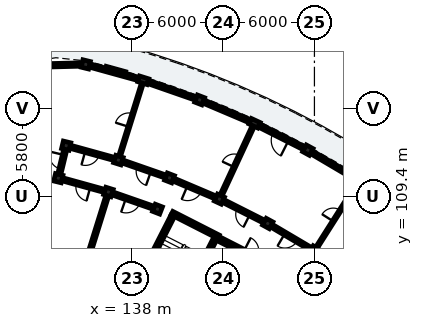
"""IFC4 building model, lengths in metres.
Left out: names, types, materials, properties, quantities, classifications, styles, units other than length and angle.
Written with IfcOpenShell. Run it as: python <this file> out.ifc"""

import sys

from ifc_helpers import new_model, si_unit, direction, frame, frame_2d, origin, origin_2d, place, context, subcontext, project, spatial, rectangle, extrude, element, fill, save


model = new_model("IFC4")
c1 = context("Model", 3, precision=1e-05, world=origin(), true_north=direction((0.0, 1.0)))
c2 = subcontext(c1, "Body", "Model", "MODEL_VIEW")
j1 = project(units=[si_unit("LENGTHUNIT", "METRE"), si_unit("PLANEANGLEUNIT", "RADIAN")], contexts=[c1])
p1 = place(None, origin())
s1 = spatial("IfcSite", under=j1, at=p1, CompositionType="ELEMENT")
p2 = place(p1, origin())
s2 = spatial("IfcBuilding", under=s1, at=p2, CompositionType="ELEMENT")
p3 = place(p2, frame((0.0, 0.0, 35.72)))
s3 = spatial("IfcBuildingStorey", under=s2, at=p3, CompositionType="ELEMENT", Elevation=35.72)
p4 = place(p3, frame((140.684, 108.139, 0.0), z_axis=(0.0, 0.0, 1.0), x_axis=(-0.453992276384, -0.891005618941, 0.0)))
e1 = element("IfcWall", 1, at=p4, inside=s3, PredefinedType="SHEAR", context=c2, shape_type="SweptSolid", body=[
    extrude(rectangle(XDim=6.6, YDim=0.25, at=frame_2d((3.3, 0.0))), origin(), (0.0, 0.0, 1.0), 3.11),
])
p5 = place(p3, frame((140.629, 108.307, 0.0), z_axis=(0.0, 0.0, 1.0), x_axis=(0.891032414707, -0.453939683153, 0.0)))
e2 = element("IfcWall", 2, at=p5, inside=s3, PredefinedType="SHEAR", context=c2, shape_type="SweptSolid", body=[
    extrude(rectangle(XDim=3.42, YDim=0.25, at=frame_2d((1.71, 0.0))), origin(), (0.0, 0.0, 1.0), 3.11),
])
p6 = place(p3, frame((143.509, 106.699, 0.0), z_axis=(0.0, 0.0, 1.0), x_axis=(-0.453992276384, -0.891005618941, 0.0)))
e3 = element("IfcWall", 3, at=p6, inside=s3, PredefinedType="SHEAR", context=c2, shape_type="SweptSolid", body=[
    extrude(rectangle(XDim=6.6, YDim=0.25, at=frame_2d((3.3, 0.0))), origin(), (0.0, 0.0, 1.0), 3.11),
])
p7 = place(p6, frame((0.22, 0.0, 0.0)))
e4 = element("IfcOpeningElement", 4, at=p7, cuts=e3, PredefinedType="OPENING", context=c2, shape_type="SweptSolid", body=[
    extrude(rectangle(XDim=1.05, YDim=2.15, at=frame_2d((0.525, 1.075))), frame((0.0, 0.135, 0.0), z_axis=(0.0, -1.0, 0.0), x_axis=(1.0, 0.0, 0.0)), (0.0, 0.0, 1.0), 0.27),
])
for number, where, z_axis, x_axis in (
    (5, (149.997, 105.813, 0.0), (0.0, 0.0, 1.0), (0.536, 0.844, 0.0)),
    (6, (146.928, 107.625, 0.0), (0.0, 0.0, 1.0), (0.48, 0.877, 0.0)),
    (7, (149.567, 112.451, 0.0), (0.0, 0.0, 1.0), (0.48, 0.877, 0.0)),
    (8, (143.748, 109.23, 0.0), (0.0, 0.0, 1.0), (0.421, 0.907, 0.0)),
):
    element("IfcColumn", number, at=place(p3, frame(where, z_axis=z_axis, x_axis=x_axis)), inside=s3, PredefinedType="COLUMN", context=c2, shape_type="SweptSolid", body=[
        extrude(rectangle(XDim=0.5, YDim=0.5, at=origin_2d()), origin(), (0.0, 0.0, 1.0), 3.115),
    ])
p8 = place(p3, frame((146.062, 114.219, 0.0), z_axis=(0.0, 0.0, 1.0), x_axis=(0.420859860775, 0.907125668024, 0.0)))
e9 = element("IfcColumn", 9, at=p8, inside=s3, PredefinedType="PILASTER", context=c2, shape_type="SweptSolid", body=[
    extrude(rectangle(XDim=0.39, YDim=0.63, at=origin_2d()), origin(), (0.0, 0.0, 1.0), 3.115),
])
for number, where, z_axis, x_axis in (
    (10, (139.675, 108.57, 0.0), (0.0, 0.0, 1.0), (0.36, 0.933, 0.0)),
    (11, (140.468, 110.622, 0.0), (0.0, 0.0, 1.0), (0.36, 0.933, 0.0)),
    (12, (142.448, 115.753, 0.0), (0.0, 0.0, 1.0), (0.36, 0.933, 0.0)),
    (13, (136.448, 109.695, 0.0), (0.0, 0.0, 1.0), (0.298, 0.955, 0.0)),
    (14, (137.103, 111.795, 0.0), (0.0, 0.0, 1.0), (0.298, 0.955, 0.0)),
):
    element("IfcColumn", number, at=place(p3, frame(where, z_axis=z_axis, x_axis=x_axis)), inside=s3, PredefinedType="COLUMN", context=c2, shape_type="SweptSolid", body=[
        extrude(rectangle(XDim=0.5, YDim=0.5, at=origin_2d()), origin(), (0.0, 0.0, 1.0), 3.115),
    ])
p9 = place(p3, frame((138.742, 117.046, 0.0), z_axis=(0.0, 0.0, 1.0), x_axis=(0.297930225503, 0.954587649581, 0.0)))
e15 = element("IfcColumn", 15, at=p9, inside=s3, PredefinedType="PILASTER", context=c2, shape_type="SweptSolid", body=[
    extrude(rectangle(XDim=0.39, YDim=0.63, at=origin_2d()), origin(), (0.0, 0.0, 1.0), 3.115),
])
for number, where, z_axis, x_axis in (
    (16, (133.153, 110.606, 0.0), (0.0, 0.0, 1.0), (0.234, 0.972, 0.0)),
    (17, (133.669, 112.744, 0.0), (0.0, 0.0, 1.0), (0.234, 0.972, 0.0)),
    (18, (134.958, 118.091, 0.0), (0.0, 0.0, 1.0), (0.234, 0.972, 0.0)),
):
    element("IfcColumn", number, at=place(p3, frame(where, z_axis=z_axis, x_axis=x_axis)), inside=s3, PredefinedType="COLUMN", context=c2, shape_type="SweptSolid", body=[
        extrude(rectangle(XDim=0.5, YDim=0.5, at=origin_2d()), origin(), (0.0, 0.0, 1.0), 3.115),
    ])
p10 = place(p3, frame((152.805, 110.539, 0.0), z_axis=(0.0, 0.0, 1.0), x_axis=(-0.861133733249, 0.508378494294, 0.0)))
e19 = element("IfcWall", 19, at=p10, inside=s3, PredefinedType="SOLIDWALL", context=c2, shape_type="SweptSolid", body=[
    extrude(rectangle(XDim=3.541, YDim=0.22, at=frame_2d((1.771, 0.0))), origin(), (0.0, 0.0, 1.0), 2.355),
])
p11 = place(p10, frame((0.896, 0.0, 0.35)))
e20 = element("IfcOpeningElement", 20, at=p11, cuts=e19, PredefinedType="OPENING", context=c2, shape_type="SweptSolid", body=[
    extrude(rectangle(XDim=1.75, YDim=1.85, at=frame_2d((0.875, 0.925))), frame((0.0, 0.12, 0.0), z_axis=(0.0, -1.0, 0.0), x_axis=(1.0, 0.0, 0.0)), (0.0, 0.0, 1.0), 0.24),
])
p12 = place(p3, frame((149.371, 112.55, 0.0), z_axis=(0.0, 0.0, 1.0), x_axis=(-0.892766264705, 0.450520140066, 0.0)))
e21 = element("IfcWall", 21, at=p12, inside=s3, PredefinedType="SOLIDWALL", context=c2, shape_type="SweptSolid", body=[
    extrude(rectangle(XDim=3.541, YDim=0.22, at=frame_2d((1.771, 0.0))), origin(), (0.0, 0.0, 1.0), 2.355),
])
p13 = place(p12, frame((1.2, 0.0, 0.0)))
e22 = element("IfcOpeningElement", 22, at=p13, cuts=e21, PredefinedType="OPENING", context=c2, shape_type="SweptSolid", body=[
    extrude(rectangle(XDim=1.14, YDim=2.16, at=frame_2d((0.57, 1.08))), frame((0.0, 0.12, 0.0), z_axis=(0.0, -1.0, 0.0), x_axis=(1.0, 0.0, 0.0)), (0.0, 0.0, 1.0), 0.24),
])
p14 = place(p3, frame((145.91, 114.284, 0.0), z_axis=(0.0, 0.0, 1.0), x_axis=(-0.920498375564, 0.390746389088, 0.0)))
e23 = element("IfcWall", 23, at=p14, inside=s3, PredefinedType="SOLIDWALL", context=c2, shape_type="SweptSolid", body=[
    extrude(rectangle(XDim=3.541, YDim=0.22, at=frame_2d((1.771, 0.0))), origin(), (0.0, 0.0, 1.0), 2.355),
])
p15 = place(p14, frame((1.031, 0.0, 0.55)))
e24 = element("IfcOpeningElement", 24, at=p15, cuts=e23, PredefinedType="OPENING", context=c2, shape_type="SweptSolid", body=[
    extrude(rectangle(XDim=1.48, YDim=1.62, at=frame_2d((0.74, 0.81))), frame((0.0, 0.12, 0.0), z_axis=(0.0, -1.0, 0.0), x_axis=(1.0, 0.0, 0.0)), (0.0, 0.0, 1.0), 0.24),
])
p16 = place(p3, frame((142.241, 115.826, 0.0), z_axis=(0.0, 0.0, 1.0), x_axis=(-0.944250036963, 0.329229202373, 0.0)))
e25 = element("IfcWall", 25, at=p16, inside=s3, PredefinedType="SOLIDWALL", context=c2, shape_type="SweptSolid", body=[
    extrude(rectangle(XDim=3.541, YDim=0.22, at=frame_2d((1.771, 0.0))), origin(), (0.0, 0.0, 1.0), 2.355),
])
p17 = place(p16, frame((1.17, 0.0, 0.55)))
e26 = element("IfcOpeningElement", 26, at=p17, cuts=e25, PredefinedType="OPENING", context=c2, shape_type="SweptSolid", body=[
    extrude(rectangle(XDim=1.2, YDim=1.51, at=frame_2d((0.6, 0.755))), frame((0.0, 0.12, 0.0), z_axis=(0.0, -1.0, 0.0), x_axis=(1.0, 0.0, 0.0)), (0.0, 0.0, 1.0), 0.24),
])
p18 = place(p3, frame((138.583, 117.09, 0.0), z_axis=(0.0, 0.0, 1.0), x_axis=(-0.963891366843, 0.266295762125, 0.0)))
e27 = element("IfcWall", 27, at=p18, inside=s3, PredefinedType="SOLIDWALL", context=c2, shape_type="SweptSolid", body=[
    extrude(rectangle(XDim=3.541, YDim=0.22, at=frame_2d((1.771, 0.0))), origin(), (0.0, 0.0, 1.0), 2.355),
])
p19 = place(p18, frame((1.11, 0.0, 0.55)))
e28 = element("IfcOpeningElement", 28, at=p19, cuts=e27, PredefinedType="OPENING", context=c2, shape_type="SweptSolid", body=[
    extrude(rectangle(XDim=1.32, YDim=1.585, at=frame_2d((0.66, 0.792))), frame((0.0, 0.12, 0.0), z_axis=(0.0, -1.0, 0.0), x_axis=(1.0, 0.0, 0.0)), (0.0, 0.0, 1.0), 0.24),
])
p20 = place(p3, frame((131.051, 117.993, 0.0), z_axis=(0.0, 0.0, 1.0), x_axis=(0.999683064576, 0.025174796915, 0.0)))
e29 = element("IfcWall", 29, at=p20, inside=s3, PredefinedType="SOLIDWALL", context=c2, shape_type="SweptSolid", body=[
    extrude(rectangle(XDim=3.908, YDim=0.22, at=frame_2d((1.954, 0.0))), origin(), (0.0, 0.0, 1.0), 2.355),
])
p21 = place(p20, frame((1.029, 0.0, 0.4)))
e30 = element("IfcOpeningElement", 30, at=p21, cuts=e29, PredefinedType="OPENING", context=c2, shape_type="SweptSolid", body=[
    extrude(rectangle(XDim=1.85, YDim=1.72, at=frame_2d((0.925, 0.86))), frame((0.0, 0.12, 0.0), z_axis=(0.0, -1.0, 0.0), x_axis=(1.0, 0.0, 0.0)), (0.0, 0.0, 1.0), 0.24),
])
p22 = place(p3, frame((143.625, 106.696, 0.0), z_axis=(0.0, 0.0, 1.0), x_axis=(0.891003372311, -0.453996685595, 0.0)))
e31 = element("IfcWall", 31, at=p22, inside=s3, PredefinedType="PARTITIONING", context=c2, shape_type="SweptSolid", body=[
    extrude(rectangle(XDim=4.9, YDim=0.22, at=frame_2d((2.45, 0.0))), origin(), (0.0, 0.0, 1.0), 2.34),
])
p23 = place(p22, frame((1.95, 0.0, 0.0)))
e32 = element("IfcOpeningElement", 32, at=p23, cuts=e31, PredefinedType="OPENING", context=c2, shape_type="SweptSolid", body=[
    extrude(rectangle(XDim=0.98, YDim=2.14, at=frame_2d((0.49, 1.07))), frame((0.0, 0.12, 0.0), z_axis=(0.0, -1.0, 0.0), x_axis=(1.0, 0.0, 0.0)), (0.0, 0.0, 1.0), 0.24),
])
p24 = place(p3, frame((150.211, 106.151, 0.0), z_axis=(0.0, 0.0, 1.0), x_axis=(0.536492262982, 0.843905238614, 0.0)))
e33 = element("IfcWall", 33, at=p24, inside=s3, PredefinedType="PARTITIONING", context=c2, shape_type="SweptSolid", body=[
    extrude(rectangle(XDim=4.7, YDim=0.125, at=frame_2d((2.35, 0.0))), origin(), (0.0, 0.0, 1.0), 2.37),
])
p25 = place(p24, frame((1.915, 0.0, 0.0)))
e34 = element("IfcOpeningElement", 34, at=p25, cuts=e33, PredefinedType="OPENING", context=c2, shape_type="SweptSolid", body=[
    extrude(rectangle(XDim=0.87, YDim=2.08, at=frame_2d((0.435, 1.04))), frame((0.0, 0.073, 0.0), z_axis=(0.0, -1.0, 0.0), x_axis=(1.0, 0.0, 0.0)), (0.0, 0.0, 1.0), 0.145),
])
p26 = place(p3, frame((149.695, 105.991, 0.0), z_axis=(0.0, 0.0, 1.0), x_axis=(-0.861113214678, 0.508413248753, 0.0)))
e35 = element("IfcWall", 35, at=p26, inside=s3, PredefinedType="PARTITIONING", context=c2, shape_type="SweptSolid", body=[
    extrude(rectangle(XDim=2.863, YDim=0.205, at=frame_2d((1.432, 0.0))), origin(), (0.0, 0.0, 1.0), 2.37),
])
p27 = place(p26, frame((0.957, 0.0, 0.0)))
e36 = element("IfcOpeningElement", 36, at=p27, cuts=e35, PredefinedType="OPENING", context=c2, shape_type="SweptSolid", body=[
    extrude(rectangle(XDim=0.95, YDim=2.13, at=frame_2d((0.475, 1.065))), frame((0.0, 0.113, 0.0), z_axis=(0.0, -1.0, 0.0), x_axis=(1.0, 0.0, 0.0)), (0.0, 0.0, 1.0), 0.225),
])
p28 = place(p3, frame((146.616, 107.782, 0.0), z_axis=(0.0, 0.0, 1.0), x_axis=(-0.89273239336, 0.450587254419, 0.0)))
e37 = element("IfcWall", 37, at=p28, inside=s3, PredefinedType="PARTITIONING", context=c2, shape_type="SweptSolid", body=[
    extrude(rectangle(XDim=2.863, YDim=0.205, at=frame_2d((1.432, 0.0))), origin(), (0.0, 0.0, 1.0), 2.37),
])
p29 = place(p28, frame((0.967, 0.0, 0.0)))
e38 = element("IfcOpeningElement", 38, at=p29, cuts=e37, PredefinedType="OPENING", context=c2, shape_type="SweptSolid", body=[
    extrude(rectangle(XDim=0.93, YDim=2.12, at=frame_2d((0.465, 1.06))), frame((0.0, 0.113, 0.0), z_axis=(0.0, -1.0, 0.0), x_axis=(1.0, 0.0, 0.0)), (0.0, 0.0, 1.0), 0.225),
])
p30 = place(p3, frame((143.916, 109.593, 0.0), z_axis=(0.0, 0.0, 1.0), x_axis=(0.420862519045, 0.907124434718, 0.0)))
e39 = element("IfcWall", 39, at=p30, inside=s3, PredefinedType="PLUMBINGWALL", context=c2, shape_type="SweptSolid", body=[
    extrude(rectangle(XDim=4.7, YDim=0.15, at=frame_2d((2.35, 0.0))), origin(), (0.0, 0.0, 1.0), 2.37),
])
p31 = place(p30, frame((1.92, 0.0, 0.0)))
e40 = element("IfcOpeningElement", 40, at=p31, cuts=e39, PredefinedType="OPENING", context=c2, shape_type="SweptSolid", body=[
    extrude(rectangle(XDim=0.86, YDim=2.06, at=frame_2d((0.43, 1.03))), frame((0.0, 0.085, 0.0), z_axis=(0.0, -1.0, 0.0), x_axis=(1.0, 0.0, 0.0)), (0.0, 0.0, 1.0), 0.17),
])
p32 = place(p3, frame((143.425, 109.367, 0.0), z_axis=(0.0, 0.0, 1.0), x_axis=(-0.920511160294, 0.390716270168, 0.0)))
e41 = element("IfcWall", 41, at=p32, inside=s3, PredefinedType="PARTITIONING", context=c2, shape_type="SweptSolid", body=[
    extrude(rectangle(XDim=2.863, YDim=0.205, at=frame_2d((1.432, 0.0))), origin(), (0.0, 0.0, 1.0), 2.37),
])
p33 = place(p32, frame((0.937, 0.0, 0.0)))
e42 = element("IfcOpeningElement", 42, at=p33, cuts=e41, PredefinedType="OPENING", context=c2, shape_type="SweptSolid", body=[
    extrude(rectangle(XDim=0.99, YDim=2.16, at=frame_2d((0.495, 1.08))), frame((0.0, 0.113, 0.0), z_axis=(0.0, -1.0, 0.0), x_axis=(1.0, 0.0, 0.0)), (0.0, 0.0, 1.0), 0.225),
])
p34 = place(p3, frame((140.137, 110.738, 0.0), z_axis=(0.0, 0.0, 1.0), x_axis=(-0.944253820929, 0.329218349522, 0.0)))
e43 = element("IfcWall", 43, at=p34, inside=s3, PredefinedType="PARTITIONING", context=c2, shape_type="SweptSolid", body=[
    extrude(rectangle(XDim=2.863, YDim=0.205, at=frame_2d((1.432, 0.0))), origin(), (0.0, 0.0, 1.0), 2.37),
])
p35 = place(p34, frame((0.947, 0.0, 0.0)))
e44 = element("IfcOpeningElement", 44, at=p35, cuts=e43, PredefinedType="OPENING", context=c2, shape_type="SweptSolid", body=[
    extrude(rectangle(XDim=0.97, YDim=2.15, at=frame_2d((0.485, 1.075))), frame((0.0, 0.113, 0.0), z_axis=(0.0, -1.0, 0.0), x_axis=(1.0, 0.0, 0.0)), (0.0, 0.0, 1.0), 0.225),
])
p36 = place(p3, frame((139.345, 108.685, 0.0), z_axis=(0.0, 0.0, 1.0), x_axis=(-0.944265123647, 0.329185929627, 0.0)))
e45 = element("IfcWall", 45, at=p36, inside=s3, PredefinedType="PARTITIONING", context=c2, shape_type="SweptSolid", body=[
    extrude(rectangle(XDim=2.718, YDim=0.205, at=frame_2d((1.359, 0.0))), origin(), (0.0, 0.0, 1.0), 2.37),
])
p37 = place(p36, frame((0.874, 0.0, 0.0)))
e46 = element("IfcOpeningElement", 46, at=p37, cuts=e45, PredefinedType="OPENING", context=c2, shape_type="SweptSolid", body=[
    extrude(rectangle(XDim=0.97, YDim=2.15, at=frame_2d((0.485, 1.075))), frame((0.0, 0.113, 0.0), z_axis=(0.0, -1.0, 0.0), x_axis=(1.0, 0.0, 0.0)), (0.0, 0.0, 1.0), 0.225),
])
p38 = place(p3, frame((137.222, 112.177, 0.0), z_axis=(0.0, 0.0, 1.0), x_axis=(0.297905254614, 0.954595442726, 0.0)))
e47 = element("IfcWall", 47, at=p38, inside=s3, PredefinedType="PARTITIONING", context=c2, shape_type="SweptSolid", body=[
    extrude(rectangle(XDim=4.7, YDim=0.125, at=frame_2d((2.35, 0.0))), origin(), (0.0, 0.0, 1.0), 2.37),
])
p39 = place(p38, frame((1.895, 0.0, 0.0)))
e48 = element("IfcOpeningElement", 48, at=p39, cuts=e47, PredefinedType="OPENING", context=c2, shape_type="SweptSolid", body=[
    extrude(rectangle(XDim=0.91, YDim=2.1, at=frame_2d((0.455, 1.05))), frame((0.0, 0.073, 0.0), z_axis=(0.0, -1.0, 0.0), x_axis=(1.0, 0.0, 0.0)), (0.0, 0.0, 1.0), 0.145),
])
p40 = place(p3, frame((134.362, 103.013, 0.0), z_axis=(0.0, 0.0, 1.0), x_axis=(0.2979590431, 0.954578655028, 0.0)))
e49 = element("IfcWall", 49, at=p40, inside=s3, PredefinedType="PARTITIONING", context=c2, shape_type="SweptSolid", body=[
    extrude(rectangle(XDim=6.6, YDim=0.185, at=frame_2d((3.3, 0.0))), origin(), (0.0, 0.0, 1.0), 2.37),
])
p41 = place(p3, frame((136.766, 111.889, 0.0), z_axis=(0.0, 0.0, 1.0), x_axis=(-0.963890789093, 0.266297853356, 0.0)))
e50 = element("IfcWall", 50, at=p41, inside=s3, PredefinedType="PARTITIONING", context=c2, shape_type="SweptSolid", body=[
    extrude(rectangle(XDim=2.863, YDim=0.205, at=frame_2d((1.432, 0.0))), origin(), (0.0, 0.0, 1.0), 2.37),
])
p42 = place(p41, frame((0.957, 0.0, 0.0)))
e51 = element("IfcOpeningElement", 51, at=p42, cuts=e50, PredefinedType="OPENING", context=c2, shape_type="SweptSolid", body=[
    extrude(rectangle(XDim=0.95, YDim=2.13, at=frame_2d((0.475, 1.065))), frame((0.0, 0.113, 0.0), z_axis=(0.0, -1.0, 0.0), x_axis=(1.0, 0.0, 0.0)), (0.0, 0.0, 1.0), 0.225),
])
p43 = place(p3, frame((136.11, 109.789, 0.0), z_axis=(0.0, 0.0, 1.0), x_axis=(-0.96388375821, 0.266323301006, 0.0)))
e52 = element("IfcWall", 52, at=p43, inside=s3, PredefinedType="PARTITIONING", context=c2, shape_type="SweptSolid", body=[
    extrude(rectangle(XDim=2.718, YDim=0.205, at=frame_2d((1.359, 0.0))), origin(), (0.0, 0.0, 1.0), 2.37),
])
p44 = place(p43, frame((0.884, 0.0, 0.0)))
e53 = element("IfcOpeningElement", 53, at=p44, cuts=e52, PredefinedType="OPENING", context=c2, shape_type="SweptSolid", body=[
    extrude(rectangle(XDim=0.95, YDim=2.13, at=frame_2d((0.475, 1.065))), frame((0.0, 0.113, 0.0), z_axis=(0.0, -1.0, 0.0), x_axis=(1.0, 0.0, 0.0)), (0.0, 0.0, 1.0), 0.225),
])
p45 = place(p3, frame((133.165, 110.654, 0.0), z_axis=(0.0, 0.0, 1.0), x_axis=(0.23437535251, 0.972146179407, 0.0)))
e54 = element("IfcWall", 54, at=p45, inside=s3, PredefinedType="PARTITIONING", context=c2, shape_type="SweptSolid", body=[
    extrude(rectangle(XDim=2.1, YDim=0.205, at=frame_2d((1.05, 0.0))), origin(), (0.0, 0.0, 1.0), 2.37),
])
p46 = place(p45, frame((0.57, 0.0, 0.0)))
e55 = element("IfcOpeningElement", 55, at=p46, cuts=e54, PredefinedType="OPENING", context=c2, shape_type="SweptSolid", body=[
    extrude(rectangle(XDim=0.95, YDim=2.13, at=frame_2d((0.475, 1.065))), frame((0.0, 0.113, 0.0), z_axis=(0.0, -1.0, 0.0), x_axis=(1.0, 0.0, 0.0)), (0.0, 0.0, 1.0), 0.225),
])
p47 = place(p11, origin())
e56 = element("IfcWindow", 56, at=p47, inside=s3, PartitioningType="SINGLE_PANEL", PredefinedType="WINDOW", context=c2, shape_type="SweptSolid", body=[
    extrude(rectangle(XDim=1.75, YDim=1.85, at=frame_2d((0.875, 0.925))), frame((0.0, 0.03, 0.0), z_axis=(0.0, -1.0, 0.0), x_axis=(1.0, 0.0, 0.0)), (0.0, 0.0, 1.0), 0.06),
])
fill(e20, e56)
p48 = place(p13, origin())
e57 = element("IfcDoor", 57, at=p48, inside=s3, OperationType="SINGLE_SWING_LEFT", PredefinedType="DOOR", context=c2, shape_type="SweptSolid", body=[
    extrude(rectangle(XDim=1.14, YDim=2.16, at=frame_2d((0.57, 1.08))), frame((0.0, 0.025, 0.0), z_axis=(0.0, -1.0, 0.0), x_axis=(1.0, 0.0, 0.0)), (0.0, 0.0, 1.0), 0.05),
])
fill(e22, e57)
p49 = place(p15, origin())
e58 = element("IfcWindow", 58, at=p49, inside=s3, PartitioningType="SINGLE_PANEL", PredefinedType="WINDOW", context=c2, shape_type="SweptSolid", body=[
    extrude(rectangle(XDim=1.48, YDim=1.62, at=frame_2d((0.74, 0.81))), frame((0.0, 0.03, 0.0), z_axis=(0.0, -1.0, 0.0), x_axis=(1.0, 0.0, 0.0)), (0.0, 0.0, 1.0), 0.06),
])
fill(e24, e58)
p50 = place(p17, origin())
e59 = element("IfcWindow", 59, at=p50, inside=s3, PartitioningType="SINGLE_PANEL", PredefinedType="WINDOW", context=c2, shape_type="SweptSolid", body=[
    extrude(rectangle(XDim=1.2, YDim=1.51, at=frame_2d((0.6, 0.755))), frame((0.0, 0.03, 0.0), z_axis=(0.0, -1.0, 0.0), x_axis=(1.0, 0.0, 0.0)), (0.0, 0.0, 1.0), 0.06),
])
fill(e26, e59)
p51 = place(p19, origin())
e60 = element("IfcWindow", 60, at=p51, inside=s3, PartitioningType="SINGLE_PANEL", PredefinedType="WINDOW", context=c2, shape_type="SweptSolid", body=[
    extrude(rectangle(XDim=1.32, YDim=1.585, at=frame_2d((0.66, 0.792))), frame((0.0, 0.03, 0.0), z_axis=(0.0, -1.0, 0.0), x_axis=(1.0, 0.0, 0.0)), (0.0, 0.0, 1.0), 0.06),
])
fill(e28, e60)
p52 = place(p21, origin())
e61 = element("IfcWindow", 61, at=p52, inside=s3, PartitioningType="SINGLE_PANEL", PredefinedType="WINDOW", context=c2, shape_type="SweptSolid", body=[
    extrude(rectangle(XDim=1.85, YDim=1.72, at=frame_2d((0.925, 0.86))), frame((0.0, 0.03, 0.0), z_axis=(0.0, -1.0, 0.0), x_axis=(1.0, 0.0, 0.0)), (0.0, 0.0, 1.0), 0.06),
])
fill(e30, e61)
p53 = place(p7, origin())
e62 = element("IfcDoor", 62, at=p53, inside=s3, OperationType="SINGLE_SWING_LEFT", PredefinedType="DOOR", context=c2, shape_type="SweptSolid", body=[
    extrude(rectangle(XDim=1.05, YDim=2.15, at=frame_2d((0.525, 1.075))), frame((0.0, 0.025, 0.0), z_axis=(0.0, -1.0, 0.0), x_axis=(1.0, 0.0, 0.0)), (0.0, 0.0, 1.0), 0.05),
])
fill(e4, e62)
p54 = place(p25, origin())
e63 = element("IfcDoor", 63, at=p54, inside=s3, OperationType="SINGLE_SWING_LEFT", PredefinedType="DOOR", context=c2, shape_type="SweptSolid", body=[
    extrude(rectangle(XDim=0.87, YDim=2.08, at=frame_2d((0.435, 1.04))), frame((0.0, 0.025, 0.0), z_axis=(0.0, -1.0, 0.0), x_axis=(1.0, 0.0, 0.0)), (0.0, 0.0, 1.0), 0.05),
])
fill(e34, e63)
p55 = place(p27, origin())
e64 = element("IfcDoor", 64, at=p55, inside=s3, OperationType="SINGLE_SWING_RIGHT", PredefinedType="DOOR", context=c2, shape_type="SweptSolid", body=[
    extrude(rectangle(XDim=0.95, YDim=2.13, at=frame_2d((0.475, 1.065))), frame((0.0, 0.025, 0.0), z_axis=(0.0, -1.0, 0.0), x_axis=(1.0, 0.0, 0.0)), (0.0, 0.0, 1.0), 0.05),
])
fill(e36, e64)
p56 = place(p29, origin())
e65 = element("IfcDoor", 65, at=p56, inside=s3, OperationType="SINGLE_SWING_LEFT", PredefinedType="DOOR", context=c2, shape_type="SweptSolid", body=[
    extrude(rectangle(XDim=0.93, YDim=2.12, at=frame_2d((0.465, 1.06))), frame((0.0, 0.025, 0.0), z_axis=(0.0, -1.0, 0.0), x_axis=(1.0, 0.0, 0.0)), (0.0, 0.0, 1.0), 0.05),
])
fill(e38, e65)
p57 = place(p31, origin())
e66 = element("IfcDoor", 66, at=p57, inside=s3, OperationType="SINGLE_SWING_LEFT", PredefinedType="DOOR", context=c2, shape_type="SweptSolid", body=[
    extrude(rectangle(XDim=0.86, YDim=2.06, at=frame_2d((0.43, 1.03))), frame((0.0, 0.025, 0.0), z_axis=(0.0, -1.0, 0.0), x_axis=(1.0, 0.0, 0.0)), (0.0, 0.0, 1.0), 0.05),
])
fill(e40, e66)
p58 = place(p33, origin())
e67 = element("IfcDoor", 67, at=p58, inside=s3, OperationType="SINGLE_SWING_RIGHT", PredefinedType="DOOR", context=c2, shape_type="SweptSolid", body=[
    extrude(rectangle(XDim=0.99, YDim=2.16, at=frame_2d((0.495, 1.08))), frame((0.0, 0.025, 0.0), z_axis=(0.0, -1.0, 0.0), x_axis=(1.0, 0.0, 0.0)), (0.0, 0.0, 1.0), 0.05),
])
fill(e42, e67)
p59 = place(p35, origin())
e68 = element("IfcDoor", 68, at=p59, inside=s3, OperationType="SINGLE_SWING_LEFT", PredefinedType="DOOR", context=c2, shape_type="SweptSolid", body=[
    extrude(rectangle(XDim=0.97, YDim=2.15, at=frame_2d((0.485, 1.075))), frame((0.0, 0.025, 0.0), z_axis=(0.0, -1.0, 0.0), x_axis=(1.0, 0.0, 0.0)), (0.0, 0.0, 1.0), 0.05),
])
fill(e44, e68)
p60 = place(p37, origin())
e69 = element("IfcDoor", 69, at=p60, inside=s3, OperationType="SINGLE_SWING_RIGHT", PredefinedType="DOOR", context=c2, shape_type="SweptSolid", body=[
    extrude(rectangle(XDim=0.97, YDim=2.15, at=frame_2d((0.485, 1.075))), frame((0.0, 0.025, 0.0), z_axis=(0.0, -1.0, 0.0), x_axis=(1.0, 0.0, 0.0)), (0.0, 0.0, 1.0), 0.05),
])
fill(e46, e69)
p61 = place(p39, origin())
e70 = element("IfcDoor", 70, at=p61, inside=s3, OperationType="SINGLE_SWING_LEFT", PredefinedType="DOOR", context=c2, shape_type="SweptSolid", body=[
    extrude(rectangle(XDim=0.91, YDim=2.1, at=frame_2d((0.455, 1.05))), frame((0.0, 0.025, 0.0), z_axis=(0.0, -1.0, 0.0), x_axis=(1.0, 0.0, 0.0)), (0.0, 0.0, 1.0), 0.05),
])
fill(e48, e70)
p62 = place(p42, origin())
e71 = element("IfcDoor", 71, at=p62, inside=s3, OperationType="SINGLE_SWING_RIGHT", PredefinedType="DOOR", context=c2, shape_type="SweptSolid", body=[
    extrude(rectangle(XDim=0.95, YDim=2.13, at=frame_2d((0.475, 1.065))), frame((0.0, 0.025, 0.0), z_axis=(0.0, -1.0, 0.0), x_axis=(1.0, 0.0, 0.0)), (0.0, 0.0, 1.0), 0.05),
])
fill(e51, e71)
p63 = place(p44, origin())
e72 = element("IfcDoor", 72, at=p63, inside=s3, OperationType="SINGLE_SWING_LEFT", PredefinedType="DOOR", context=c2, shape_type="SweptSolid", body=[
    extrude(rectangle(XDim=0.95, YDim=2.13, at=frame_2d((0.475, 1.065))), frame((0.0, 0.025, 0.0), z_axis=(0.0, -1.0, 0.0), x_axis=(1.0, 0.0, 0.0)), (0.0, 0.0, 1.0), 0.05),
])
fill(e53, e72)
p64 = place(p46, origin())
e73 = element("IfcDoor", 73, at=p64, inside=s3, OperationType="SINGLE_SWING_RIGHT", PredefinedType="DOOR", context=c2, shape_type="SweptSolid", body=[
    extrude(rectangle(XDim=0.95, YDim=2.13, at=frame_2d((0.475, 1.065))), frame((0.0, 0.025, 0.0), z_axis=(0.0, -1.0, 0.0), x_axis=(1.0, 0.0, 0.0)), (0.0, 0.0, 1.0), 0.05),
])
fill(e55, e73)
save(model, sys.argv[1])
